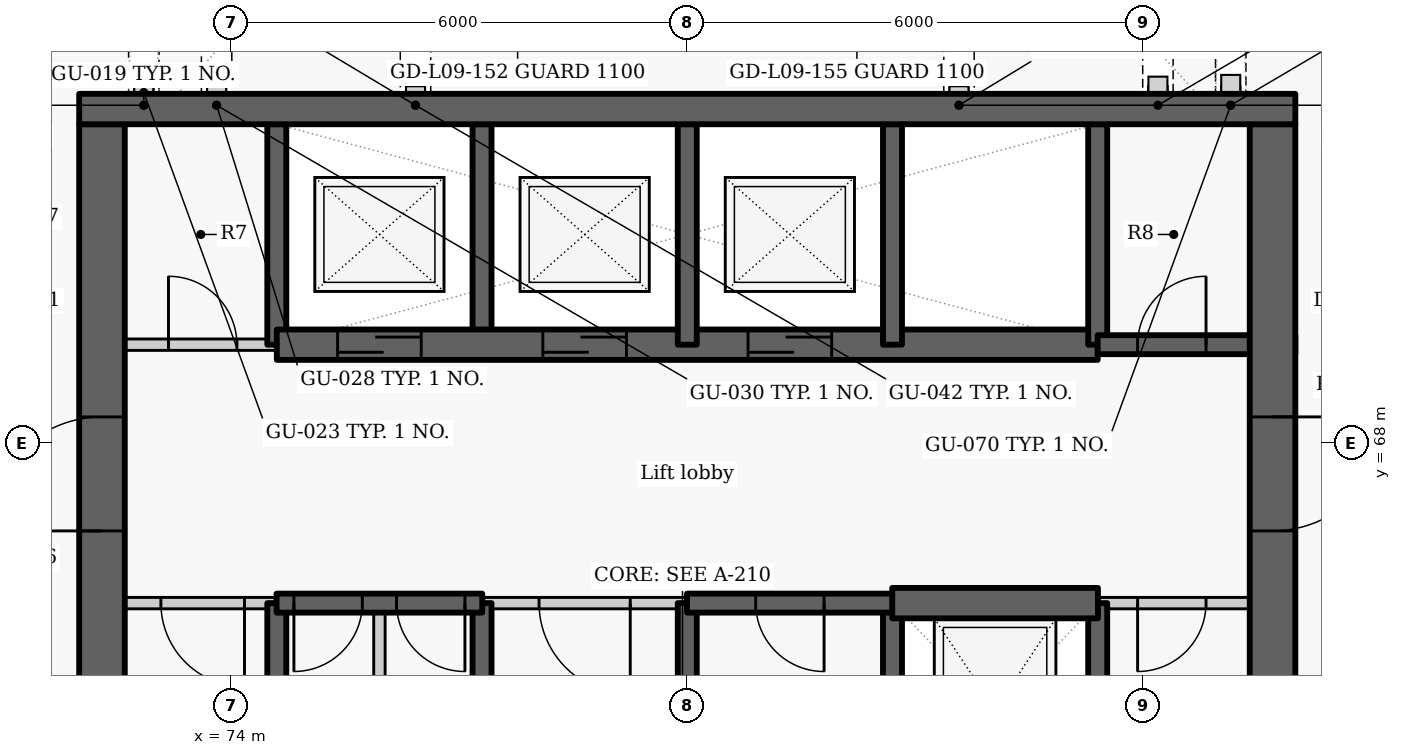
"""IFC4 building model, lengths in metres.
Left out: names, types, materials, properties, quantities, classifications, styles, units other than length and angle.
Written with IfcOpenShell. Run it as: python <this file> out.ifc"""

import sys

from ifc_helpers import new_model, si_unit, direction, frame, frame_2d, origin, place, context, subcontext, project, spatial, rectangle, extrude, element, fill, save


model = new_model("IFC4")
c1 = context("Model", 3, precision=1e-05, world=origin(), true_north=direction((0.0, 1.0)))
c2 = subcontext(c1, "Body", "Model", "MODEL_VIEW")
j1 = project(units=[si_unit("LENGTHUNIT", "METRE"), si_unit("PLANEANGLEUNIT", "RADIAN")], contexts=[c1])
p1 = place(None, origin())
s1 = spatial("IfcSite", under=j1, at=p1, CompositionType="ELEMENT")
p2 = place(p1, origin())
s2 = spatial("IfcBuilding", under=s1, at=p2, CompositionType="ELEMENT")
p3 = place(p2, frame((0.0, 0.0, 38.1)))
s3 = spatial("IfcBuildingStorey", under=s2, at=p3, CompositionType="ELEMENT", Elevation=38.1)
p4 = place(p3, frame((74.6, 63.1, -0.4), z_axis=(0.0, 0.0, 1.0), x_axis=(0.0, 1.0, 0.0)))
e1 = element("IfcWall", 1, at=p4, inside=s3, PredefinedType="SHEAR", context=c2, shape_type="SweptSolid", body=[
    extrude(rectangle(XDim=2.8, YDim=0.25, at=frame_2d((1.4, 0.0))), origin(), (0.0, 0.0, 1.0), 3.425),
])
p5 = place(p3, frame((74.6, 69.3, -0.4), z_axis=(0.0, 0.0, 1.0), x_axis=(0.0, 1.0, 0.0)))
e2 = element("IfcWall", 2, at=p5, inside=s3, PredefinedType="SHEAR", context=c2, shape_type="SweptSolid", body=[
    extrude(rectangle(XDim=2.9, YDim=0.25, at=frame_2d((1.45, 0.0))), origin(), (0.0, 0.0, 1.0), 3.425),
])
p6 = place(p3, frame((72.0, 69.3, 0.0), z_axis=(0.0, 0.0, 1.0), x_axis=(1.0, 0.0, 0.0)))
e3 = element("IfcWall", 3, at=p6, inside=s3, PredefinedType="PARTITIONING", context=c2, shape_type="SweptSolid", body=[
    extrude(rectangle(XDim=2.6, YDim=0.15, at=frame_2d((1.3, 0.0))), origin(), (0.0, 0.0, 1.0), 3.025),
])
p7 = place(p6, frame((1.175, 0.0, 0.0)))
e4 = element("IfcOpeningElement", 4, at=p7, cuts=e3, PredefinedType="OPENING", context=c2, shape_type="SweptSolid", body=[
    extrude(rectangle(XDim=0.9, YDim=2.1, at=frame_2d((0.45, 1.05))), frame((0.0, 0.085, 0.0), z_axis=(0.0, -1.0, 0.0), x_axis=(1.0, 0.0, 0.0)), (0.0, 0.0, 1.0), 0.17),
])
p8 = place(p3, frame((72.3, 63.1, -0.4), z_axis=(0.0, 0.0, 1.0), x_axis=(0.0, 1.0, 0.0)))
e5 = element("IfcWall", 5, at=p8, inside=s3, PredefinedType="SHEAR", context=c2, shape_type="SweptSolid", body=[
    extrude(rectangle(XDim=9.1, YDim=0.6, at=frame_2d((4.55, 0.0))), origin(), (0.0, 0.0, 1.0), 3.425),
])
p9 = place(p8, frame((3.75, 0.0, 0.4)))
e6 = element("IfcOpeningElement", 6, at=p9, cuts=e5, PredefinedType="OPENING", context=c2, shape_type="SweptSolid", body=[
    extrude(rectangle(XDim=1.5, YDim=2.1, at=frame_2d((0.75, 1.05))), frame((0.0, 0.31, 0.0), z_axis=(0.0, -1.0, 0.0), x_axis=(1.0, 0.0, 0.0)), (0.0, 0.0, 1.0), 0.62),
])
p10 = place(p3, frame((77.3, 63.1, -0.4), z_axis=(0.0, 0.0, 1.0), x_axis=(0.0, 1.0, 0.0)))
e7 = element("IfcWall", 7, at=p10, inside=s3, PredefinedType="SHEAR", context=c2, shape_type="SweptSolid", body=[
    extrude(rectangle(XDim=2.8, YDim=0.25, at=frame_2d((1.4, 0.0))), origin(), (0.0, 0.0, 1.0), 3.425),
])
p11 = place(p3, frame((77.3, 69.3, -0.4), z_axis=(0.0, 0.0, 1.0), x_axis=(0.0, 1.0, 0.0)))
e8 = element("IfcWall", 8, at=p11, inside=s3, PredefinedType="SHEAR", context=c2, shape_type="SweptSolid", body=[
    extrude(rectangle(XDim=2.9, YDim=0.25, at=frame_2d((1.45, 0.0))), origin(), (0.0, 0.0, 1.0), 3.425),
])
p12 = place(p3, frame((74.6, 69.3, -0.4), z_axis=(0.0, 0.0, 1.0), x_axis=(1.0, 0.0, 0.0)))
e9 = element("IfcWall", 9, at=p12, inside=s3, PredefinedType="SHEAR", context=c2, shape_type="SweptSolid", body=[
    extrude(rectangle(XDim=10.8, YDim=0.4, at=frame_2d((5.4, 0.0))), origin(), (0.0, 0.0, 1.0), 3.425),
])
p13 = place(p12, frame((0.8, 0.0, 0.4)))
e10 = element("IfcOpeningElement", 10, at=p13, cuts=e9, PredefinedType="OPENING", context=c2, shape_type="SweptSolid", body=[
    extrude(rectangle(XDim=1.1, YDim=2.1, at=frame_2d((0.55, 1.05))), frame((0.0, 0.21, 0.0), z_axis=(0.0, -1.0, 0.0), x_axis=(1.0, 0.0, 0.0)), (0.0, 0.0, 1.0), 0.42),
])
p14 = place(p12, frame((3.5, 0.0, 0.4)))
e11 = element("IfcOpeningElement", 11, at=p14, cuts=e9, PredefinedType="OPENING", context=c2, shape_type="SweptSolid", body=[
    extrude(rectangle(XDim=1.1, YDim=2.1, at=frame_2d((0.55, 1.05))), frame((0.0, 0.21, 0.0), z_axis=(0.0, -1.0, 0.0), x_axis=(1.0, 0.0, 0.0)), (0.0, 0.0, 1.0), 0.42),
])
p15 = place(p12, frame((6.2, 0.0, 0.4)))
e12 = element("IfcOpeningElement", 12, at=p15, cuts=e9, PredefinedType="OPENING", context=c2, shape_type="SweptSolid", body=[
    extrude(rectangle(XDim=1.1, YDim=2.1, at=frame_2d((0.55, 1.05))), frame((0.0, 0.21, 0.0), z_axis=(0.0, -1.0, 0.0), x_axis=(1.0, 0.0, 0.0)), (0.0, 0.0, 1.0), 0.42),
])
p16 = place(p3, frame((80.0, 63.1, -0.4), z_axis=(0.0, 0.0, 1.0), x_axis=(0.0, 1.0, 0.0)))
e13 = element("IfcWall", 13, at=p16, inside=s3, PredefinedType="SHEAR", context=c2, shape_type="SweptSolid", body=[
    extrude(rectangle(XDim=2.8, YDim=0.25, at=frame_2d((1.4, 0.0))), origin(), (0.0, 0.0, 1.0), 3.425),
])
p17 = place(p3, frame((80.0, 69.3, -0.4), z_axis=(0.0, 0.0, 1.0), x_axis=(0.0, 1.0, 0.0)))
e14 = element("IfcWall", 14, at=p17, inside=s3, PredefinedType="SHEAR", context=c2, shape_type="SweptSolid", body=[
    extrude(rectangle(XDim=2.9, YDim=0.25, at=frame_2d((1.45, 0.0))), origin(), (0.0, 0.0, 1.0), 3.425),
])
p18 = place(p3, frame((82.7, 63.1, -0.4), z_axis=(0.0, 0.0, 1.0), x_axis=(0.0, 1.0, 0.0)))
e15 = element("IfcWall", 15, at=p18, inside=s3, PredefinedType="SHEAR", context=c2, shape_type="SweptSolid", body=[
    extrude(rectangle(XDim=2.8, YDim=0.25, at=frame_2d((1.4, 0.0))), origin(), (0.0, 0.0, 1.0), 3.425),
])
p19 = place(p3, frame((82.7, 69.3, -0.4), z_axis=(0.0, 0.0, 1.0), x_axis=(0.0, 1.0, 0.0)))
e16 = element("IfcWall", 16, at=p19, inside=s3, PredefinedType="SHEAR", context=c2, shape_type="SweptSolid", body=[
    extrude(rectangle(XDim=2.9, YDim=0.25, at=frame_2d((1.45, 0.0))), origin(), (0.0, 0.0, 1.0), 3.425),
])
p20 = place(p3, frame((85.4, 63.1, -0.4), z_axis=(0.0, 0.0, 1.0), x_axis=(0.0, 1.0, 0.0)))
e17 = element("IfcWall", 17, at=p20, inside=s3, PredefinedType="SHEAR", context=c2, shape_type="SweptSolid", body=[
    extrude(rectangle(XDim=2.8, YDim=0.25, at=frame_2d((1.4, 0.0))), origin(), (0.0, 0.0, 1.0), 3.425),
])
p21 = place(p3, frame((85.4, 69.3, -0.4), z_axis=(0.0, 0.0, 1.0), x_axis=(0.0, 1.0, 0.0)))
e18 = element("IfcWall", 18, at=p21, inside=s3, PredefinedType="SHEAR", context=c2, shape_type="SweptSolid", body=[
    extrude(rectangle(XDim=2.9, YDim=0.25, at=frame_2d((1.45, 0.0))), origin(), (0.0, 0.0, 1.0), 3.425),
])
p22 = place(p3, frame((85.4, 69.3, -0.4), z_axis=(0.0, 0.0, 1.0), x_axis=(1.0, 0.0, 0.0)))
e19 = element("IfcWall", 19, at=p22, inside=s3, PredefinedType="SHEAR", context=c2, shape_type="SweptSolid", body=[
    extrude(rectangle(XDim=2.6, YDim=0.25, at=frame_2d((1.3, 0.0))), origin(), (0.0, 0.0, 1.0), 3.425),
])
p23 = place(p22, frame((0.525, 0.0, 0.4)))
e20 = element("IfcOpeningElement", 20, at=p23, cuts=e19, PredefinedType="OPENING", context=c2, shape_type="SweptSolid", body=[
    extrude(rectangle(XDim=0.9, YDim=2.1, at=frame_2d((0.45, 1.05))), frame((0.0, 0.135, 0.0), z_axis=(0.0, -1.0, 0.0), x_axis=(1.0, 0.0, 0.0)), (0.0, 0.0, 1.0), 0.27),
])
p24 = place(p3, frame((87.7, 72.2, -0.4), z_axis=(0.0, 0.0, 1.0), x_axis=(0.0, -1.0, 0.0)))
e21 = element("IfcWall", 21, at=p24, inside=s3, PredefinedType="SHEAR", context=c2, shape_type="SweptSolid", body=[
    extrude(rectangle(XDim=15.6, YDim=0.6, at=frame_2d((7.8, 0.0))), origin(), (0.0, 0.0, 1.0), 3.425),
])
p25 = place(p24, frame((3.85, 0.0, 0.4)))
e22 = element("IfcOpeningElement", 22, at=p25, cuts=e21, PredefinedType="OPENING", context=c2, shape_type="SweptSolid", body=[
    extrude(rectangle(XDim=1.5, YDim=2.1, at=frame_2d((0.75, 1.05))), frame((0.0, 0.31, 0.0), z_axis=(0.0, -1.0, 0.0), x_axis=(1.0, 0.0, 0.0)), (0.0, 0.0, 1.0), 0.62),
])
p26 = place(p24, frame((11.8, 0.0, 0.4)))
e23 = element("IfcOpeningElement", 23, at=p26, cuts=e21, PredefinedType="OPENING", context=c2, shape_type="SweptSolid", body=[
    extrude(rectangle(XDim=1.1, YDim=2.1, at=frame_2d((0.55, 1.05))), frame((0.0, 0.31, 0.0), z_axis=(0.0, -1.0, 0.0), x_axis=(1.0, 0.0, 0.0)), (0.0, 0.0, 1.0), 0.62),
])
p27 = place(p3, frame((74.603, 65.9, 0.0), z_axis=(0.0, 0.0, 1.0), x_axis=(-1.0, 0.0, 0.0)))
e24 = element("IfcWall", 24, at=p27, inside=s3, PredefinedType="PARTITIONING", context=c2, shape_type="SweptSolid", body=[
    extrude(rectangle(XDim=2.603, YDim=0.15, at=frame_2d((1.302, 0.0))), origin(), (0.0, 0.0, 1.0), 3.025),
])
p28 = place(p27, frame((0.428, 0.0, 0.0)))
e25 = element("IfcOpeningElement", 25, at=p28, cuts=e24, PredefinedType="OPENING", context=c2, shape_type="SweptSolid", body=[
    extrude(rectangle(XDim=1.1, YDim=2.1, at=frame_2d((0.55, 1.05))), frame((0.0, 0.085, 0.0), z_axis=(0.0, -1.0, 0.0), x_axis=(1.0, 0.0, 0.0)), (0.0, 0.0, 1.0), 0.17),
])
p29 = place(p3, frame((80.003, 65.9, 0.0), z_axis=(0.0, 0.0, 1.0), x_axis=(-1.0, 0.0, 0.0)))
e26 = element("IfcWall", 26, at=p29, inside=s3, PredefinedType="PARTITIONING", context=c2, shape_type="SweptSolid", body=[
    extrude(rectangle(XDim=2.706, YDim=0.15, at=frame_2d((1.353, 0.0))), origin(), (0.0, 0.0, 1.0), 3.025),
])
p30 = place(p29, frame((0.753, 0.0, 0.0)))
e27 = element("IfcOpeningElement", 27, at=p30, cuts=e26, PredefinedType="OPENING", context=c2, shape_type="SweptSolid", body=[
    extrude(rectangle(XDim=1.2, YDim=2.1, at=frame_2d((0.6, 1.05))), frame((0.0, 0.085, 0.0), z_axis=(0.0, -1.0, 0.0), x_axis=(1.0, 0.0, 0.0)), (0.0, 0.0, 1.0), 0.17),
])
p31 = place(p3, frame((88.0, 65.9, 0.0), z_axis=(0.0, 0.0, 1.0), x_axis=(-1.0, 0.0, 0.0)))
e28 = element("IfcWall", 28, at=p31, inside=s3, PredefinedType="PARTITIONING", context=c2, shape_type="SweptSolid", body=[
    extrude(rectangle(XDim=2.603, YDim=0.15, at=frame_2d((1.302, 0.0))), origin(), (0.0, 0.0, 1.0), 3.025),
])
p32 = place(p31, frame((1.175, 0.0, 0.0)))
e29 = element("IfcOpeningElement", 29, at=p32, cuts=e28, PredefinedType="OPENING", context=c2, shape_type="SweptSolid", body=[
    extrude(rectangle(XDim=0.9, YDim=2.1, at=frame_2d((0.45, 1.05))), frame((0.0, 0.085, 0.0), z_axis=(0.0, -1.0, 0.0), x_axis=(1.0, 0.0, 0.0)), (0.0, 0.0, 1.0), 0.17),
])
p33 = place(p3, frame((77.303, 65.9, -0.4), z_axis=(0.0, 0.0, 1.0), x_axis=(-1.0, 0.0, 0.0)))
e30 = element("IfcWall", 30, at=p33, inside=s3, PredefinedType="SHEAR", context=c2, shape_type="SweptSolid", body=[
    extrude(rectangle(XDim=2.706, YDim=0.25, at=frame_2d((1.353, 0.0))), origin(), (0.0, 0.0, 1.0), 3.425),
])
p34 = place(p33, frame((1.578, 0.0, 0.4)))
e31 = element("IfcOpeningElement", 31, at=p34, cuts=e30, PredefinedType="OPENING", context=c2, shape_type="SweptSolid", body=[
    extrude(rectangle(XDim=0.9, YDim=2.1, at=frame_2d((0.45, 1.05))), frame((0.0, 0.135, 0.0), z_axis=(0.0, -1.0, 0.0), x_axis=(1.0, 0.0, 0.0)), (0.0, 0.0, 1.0), 0.27),
])
p35 = place(p33, frame((0.228, 0.0, 0.4)))
e32 = element("IfcOpeningElement", 32, at=p35, cuts=e30, PredefinedType="OPENING", context=c2, shape_type="SweptSolid", body=[
    extrude(rectangle(XDim=0.9, YDim=2.1, at=frame_2d((0.45, 1.05))), frame((0.0, 0.135, 0.0), z_axis=(0.0, -1.0, 0.0), x_axis=(1.0, 0.0, 0.0)), (0.0, 0.0, 1.0), 0.27),
])
p36 = place(p3, frame((82.703, 65.9, -0.4), z_axis=(0.0, 0.0, 1.0), x_axis=(-1.0, 0.0, 0.0)))
e33 = element("IfcWall", 33, at=p36, inside=s3, PredefinedType="SHEAR", context=c2, shape_type="SweptSolid", body=[
    extrude(rectangle(XDim=2.706, YDim=0.25, at=frame_2d((1.353, 0.0))), origin(), (0.0, 0.0, 1.0), 3.425),
])
p37 = place(p36, frame((0.903, 0.0, 0.4)))
e34 = element("IfcOpeningElement", 34, at=p37, cuts=e33, PredefinedType="OPENING", context=c2, shape_type="SweptSolid", body=[
    extrude(rectangle(XDim=0.9, YDim=2.1, at=frame_2d((0.45, 1.05))), frame((0.0, 0.135, 0.0), z_axis=(0.0, -1.0, 0.0), x_axis=(1.0, 0.0, 0.0)), (0.0, 0.0, 1.0), 0.27),
])
p38 = place(p3, frame((82.697, 65.9, -0.4), z_axis=(0.0, 0.0, 1.0), x_axis=(1.0, 0.0, 0.0)))
e35 = element("IfcWall", 35, at=p38, inside=s3, PredefinedType="SHEAR", context=c2, shape_type="SweptSolid", body=[
    extrude(rectangle(XDim=2.706, YDim=0.4, at=frame_2d((1.353, 0.0))), origin(), (0.0, 0.0, 1.0), 3.425),
])
p39 = place(p3, frame((75.95, 63.1, 0.0), z_axis=(0.0, 0.0, 1.0), x_axis=(0.0, 1.0, 0.0)))
e36 = element("IfcWall", 36, at=p39, inside=s3, PredefinedType="PARTITIONING", context=c2, shape_type="SweptSolid", body=[
    extrude(rectangle(XDim=2.8, YDim=0.15, at=frame_2d((1.4, 0.0))), origin(), (0.0, 0.0, 1.0), 3.025),
])
p40 = place(p3, frame((72.0, 72.4, -0.4), z_axis=(0.0, 0.0, 1.0), x_axis=(1.0, 0.0, 0.0)))
e37 = element("IfcWall", 37, at=p40, inside=s3, PredefinedType="SHEAR", context=c2, shape_type="SweptSolid", body=[
    extrude(rectangle(XDim=16.0, YDim=0.4, at=frame_2d((8.0, 0.0))), origin(), (0.0, 0.0, 1.0), 3.425),
])
p41 = place(p7, origin())
e38 = element("IfcDoor", 38, at=p41, inside=s3, OperationType="SINGLE_SWING_LEFT", PredefinedType="DOOR", context=c2, shape_type="SweptSolid", body=[
    extrude(rectangle(XDim=0.9, YDim=2.1, at=frame_2d((0.45, 1.05))), frame((0.0, 0.025, 0.0), z_axis=(0.0, -1.0, 0.0), x_axis=(1.0, 0.0, 0.0)), (0.0, 0.0, 1.0), 0.05),
])
fill(e4, e38)
p42 = place(p13, origin())
e39 = element("IfcDoor", 39, at=p42, inside=s3, OperationType="SLIDING_TO_LEFT", PredefinedType="DOOR", context=c2, shape_type="SweptSolid", body=[
    extrude(rectangle(XDim=1.1, YDim=2.1, at=frame_2d((0.55, 1.05))), frame((0.0, 0.025, 0.0), z_axis=(0.0, -1.0, 0.0), x_axis=(1.0, 0.0, 0.0)), (0.0, 0.0, 1.0), 0.05),
])
fill(e10, e39)
p43 = place(p14, origin())
e40 = element("IfcDoor", 40, at=p43, inside=s3, OperationType="SLIDING_TO_LEFT", PredefinedType="DOOR", context=c2, shape_type="SweptSolid", body=[
    extrude(rectangle(XDim=1.1, YDim=2.1, at=frame_2d((0.55, 1.05))), frame((0.0, 0.025, 0.0), z_axis=(0.0, -1.0, 0.0), x_axis=(1.0, 0.0, 0.0)), (0.0, 0.0, 1.0), 0.05),
])
fill(e11, e40)
p44 = place(p15, origin())
e41 = element("IfcDoor", 41, at=p44, inside=s3, OperationType="SLIDING_TO_LEFT", PredefinedType="DOOR", context=c2, shape_type="SweptSolid", body=[
    extrude(rectangle(XDim=1.1, YDim=2.1, at=frame_2d((0.55, 1.05))), frame((0.0, 0.025, 0.0), z_axis=(0.0, -1.0, 0.0), x_axis=(1.0, 0.0, 0.0)), (0.0, 0.0, 1.0), 0.05),
])
fill(e12, e41)
p45 = place(p23, origin())
e42 = element("IfcDoor", 42, at=p45, inside=s3, OperationType="SINGLE_SWING_RIGHT", PredefinedType="DOOR", context=c2, shape_type="SweptSolid", body=[
    extrude(rectangle(XDim=0.9, YDim=2.1, at=frame_2d((0.45, 1.05))), frame((0.0, 0.025, 0.0), z_axis=(0.0, -1.0, 0.0), x_axis=(1.0, 0.0, 0.0)), (0.0, 0.0, 1.0), 0.05),
])
fill(e20, e42)
p46 = place(p28, origin())
e43 = element("IfcDoor", 43, at=p46, inside=s3, OperationType="SINGLE_SWING_LEFT", PredefinedType="DOOR", context=c2, shape_type="SweptSolid", body=[
    extrude(rectangle(XDim=1.1, YDim=2.1, at=frame_2d((0.55, 1.05))), frame((0.0, 0.025, 0.0), z_axis=(0.0, -1.0, 0.0), x_axis=(1.0, 0.0, 0.0)), (0.0, 0.0, 1.0), 0.05),
])
fill(e25, e43)
p47 = place(p34, origin())
e44 = element("IfcDoor", 44, at=p47, inside=s3, OperationType="SINGLE_SWING_RIGHT", PredefinedType="DOOR", context=c2, shape_type="SweptSolid", body=[
    extrude(rectangle(XDim=0.9, YDim=2.1, at=frame_2d((0.45, 1.05))), frame((0.0, 0.025, 0.0), z_axis=(0.0, -1.0, 0.0), x_axis=(1.0, 0.0, 0.0)), (0.0, 0.0, 1.0), 0.05),
])
fill(e31, e44)
p48 = place(p35, origin())
e45 = element("IfcDoor", 45, at=p48, inside=s3, OperationType="SINGLE_SWING_LEFT", PredefinedType="DOOR", context=c2, shape_type="SweptSolid", body=[
    extrude(rectangle(XDim=0.9, YDim=2.1, at=frame_2d((0.45, 1.05))), frame((0.0, 0.025, 0.0), z_axis=(0.0, -1.0, 0.0), x_axis=(1.0, 0.0, 0.0)), (0.0, 0.0, 1.0), 0.05),
])
fill(e32, e45)
p49 = place(p30, origin())
e46 = element("IfcDoor", 46, at=p49, inside=s3, OperationType="DOUBLE_DOOR_SINGLE_SWING", PredefinedType="DOOR", context=c2, shape_type="SweptSolid", body=[
    extrude(rectangle(XDim=1.2, YDim=2.1, at=frame_2d((0.6, 1.05))), frame((0.0, 0.025, 0.0), z_axis=(0.0, -1.0, 0.0), x_axis=(1.0, 0.0, 0.0)), (0.0, 0.0, 1.0), 0.05),
])
fill(e27, e46)
p50 = place(p37, origin())
e47 = element("IfcDoor", 47, at=p50, inside=s3, OperationType="SINGLE_SWING_LEFT", PredefinedType="DOOR", context=c2, shape_type="SweptSolid", body=[
    extrude(rectangle(XDim=0.9, YDim=2.1, at=frame_2d((0.45, 1.05))), frame((0.0, 0.025, 0.0), z_axis=(0.0, -1.0, 0.0), x_axis=(1.0, 0.0, 0.0)), (0.0, 0.0, 1.0), 0.05),
])
fill(e34, e47)
p51 = place(p32, origin())
e48 = element("IfcDoor", 48, at=p51, inside=s3, OperationType="SINGLE_SWING_RIGHT", PredefinedType="DOOR", context=c2, shape_type="SweptSolid", body=[
    extrude(rectangle(XDim=0.9, YDim=2.1, at=frame_2d((0.45, 1.05))), frame((0.0, 0.025, 0.0), z_axis=(0.0, -1.0, 0.0), x_axis=(1.0, 0.0, 0.0)), (0.0, 0.0, 1.0), 0.05),
])
fill(e29, e48)
p52 = place(p25, origin())
e49 = element("IfcDoor", 49, at=p52, inside=s3, OperationType="DOUBLE_DOOR_SINGLE_SWING", PredefinedType="DOOR", context=c2, shape_type="SweptSolid", body=[
    extrude(rectangle(XDim=1.5, YDim=2.1, at=frame_2d((0.75, 1.05))), frame((0.0, 0.025, 0.0), z_axis=(0.0, -1.0, 0.0), x_axis=(1.0, 0.0, 0.0)), (0.0, 0.0, 1.0), 0.05),
])
fill(e22, e49)
p53 = place(p9, origin())
e50 = element("IfcDoor", 50, at=p53, inside=s3, OperationType="DOUBLE_DOOR_SINGLE_SWING", PredefinedType="DOOR", context=c2, shape_type="SweptSolid", body=[
    extrude(rectangle(XDim=1.5, YDim=2.1, at=frame_2d((0.75, 1.05))), frame((0.0, 0.025, 0.0), z_axis=(0.0, -1.0, 0.0), x_axis=(1.0, 0.0, 0.0)), (0.0, 0.0, 1.0), 0.05),
])
fill(e6, e50)
save(model, sys.argv[1])
